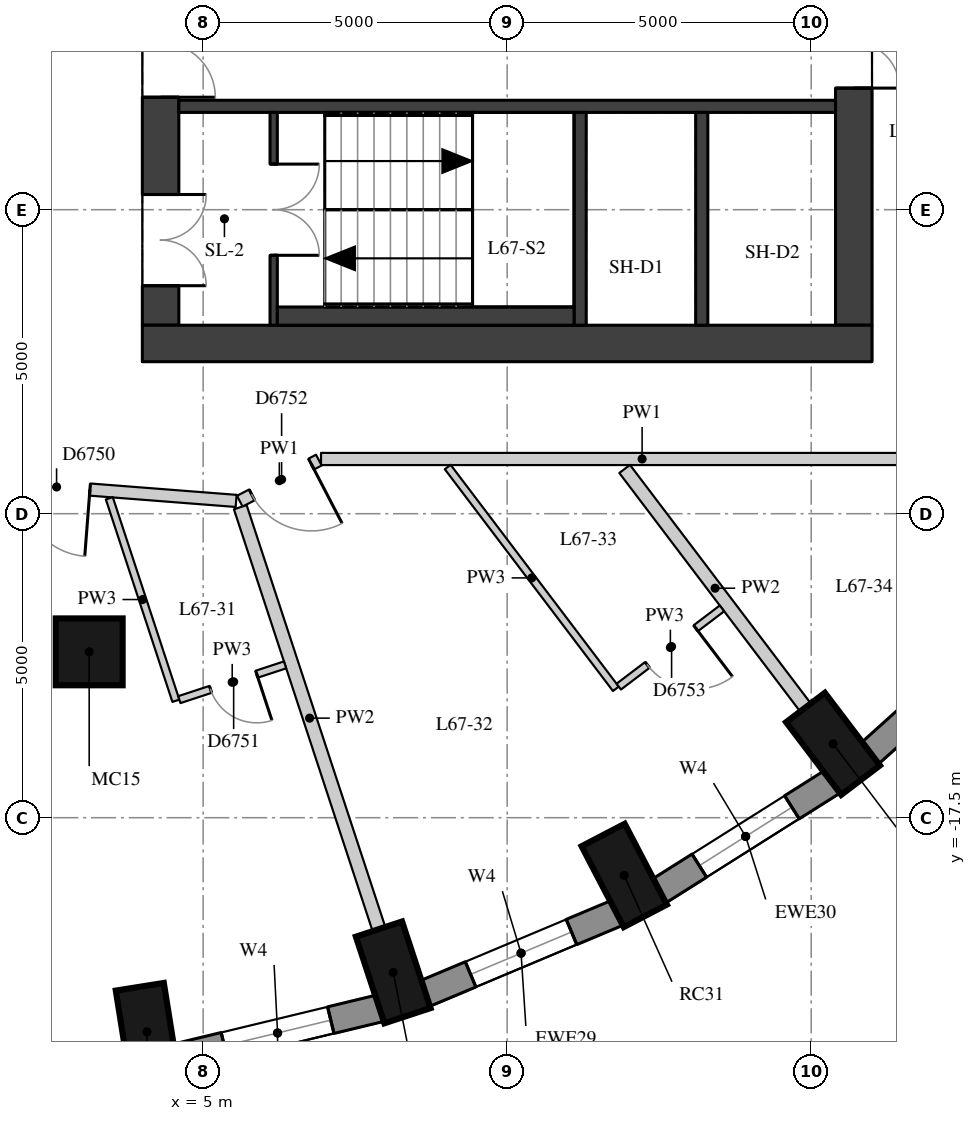
"""IFC4 building model, lengths in metres.
Left out: names, types, materials, properties, quantities, classifications, styles, units other than length and angle.
Written with IfcOpenShell. Run it as: python <this file> out.ifc"""

import sys

from ifc_helpers import new_model, si_unit, direction, frame, frame_2d, origin, origin_2d, place, context, subcontext, project, spatial, rectangle, extrude, element, fill, save


model = new_model("IFC4")
c1 = context("Model", 3, precision=1e-05, world=origin(), true_north=direction((0.0, 1.0)))
c2 = subcontext(c1, "Body", "Model", "MODEL_VIEW")
j1 = project(units=[si_unit("LENGTHUNIT", "METRE"), si_unit("PLANEANGLEUNIT", "RADIAN")], contexts=[c1])
p1 = place(None, origin())
s1 = spatial("IfcSite", under=j1, at=p1, CompositionType="ELEMENT")
p2 = place(p1, origin())
s2 = spatial("IfcBuilding", under=s1, at=p2, CompositionType="ELEMENT")
p3 = place(p2, frame((0.0, 0.0, 236.6)))
s3 = spatial("IfcBuildingStorey", under=s2, at=p3, CompositionType="ELEMENT", Elevation=236.6)
for number, where, z_axis, x_axis in (
    (1, (4.076, -21.021, 0.0), (0.0, 0.0, 1.0), (0.157, -0.988, 0.0)),
    (2, (8.125, -20.044, 0.0), (0.0, 0.0, 1.0), (0.312, -0.95, 0.0)),
    (3, (11.925, -18.449, 0.0), (0.0, 0.0, 1.0), (0.462, -0.887, 0.0)),
    (4, (15.359, -16.285, 0.0), (0.0, 0.0, 1.0), (0.604, -0.797, 0.0)),
):
    element("IfcColumn", number, at=place(p3, frame(where, z_axis=z_axis, x_axis=x_axis)), inside=s3, PredefinedType="COLUMN", context=c2, shape_type="SweptSolid", body=[
        extrude(rectangle(XDim=1.5, YDim=0.8, at=origin_2d()), origin(), (0.0, 0.0, 1.0), 3.3),
    ])
p4 = place(p3, frame((3.126, -14.772, 0.0), z_axis=(0.0, 0.0, 1.0), x_axis=(1.0, 0.0, 0.0)))
e5 = element("IfcColumn", 5, at=p4, inside=s3, PredefinedType="COLUMN", context=c2, shape_type="SweptSolid", body=[
    extrude(rectangle(XDim=1.1, YDim=1.1, at=origin_2d()), origin(), (0.0, 0.0, 1.0), 3.3),
])
p5 = place(p3, frame((4.529, -21.449, 0.0), z_axis=(0.0, 0.0, 1.0), x_axis=(0.972115243017, 0.234503633859, 0.0)))
e6 = element("IfcWall", 6, at=p5, inside=s3, PredefinedType="SOLIDWALL", context=c2, shape_type="SweptSolid", body=[
    extrude(rectangle(XDim=3.487, YDim=0.45, at=frame_2d((1.743, 0.0))), origin(), (0.0, 0.0, 1.0), 3.02),
])
p6 = place(p5, frame((0.843, 0.0, 0.4)))
e7 = element("IfcOpeningElement", 7, at=p6, cuts=e6, PredefinedType="OPENING", context=c2, shape_type="SweptSolid", body=[
    extrude(rectangle(XDim=1.8, YDim=1.75, at=frame_2d((0.9, 0.875))), frame((0.0, 0.235, 0.0), z_axis=(0.0, -1.0, 0.0), x_axis=(1.0, 0.0, 0.0)), (0.0, 0.0, 1.0), 0.47),
])
p7 = place(p3, frame((8.641, -20.395, 0.0), z_axis=(0.0, 0.0, 1.0), x_axis=(0.922049934692, 0.3870709469, 0.0)))
e8 = element("IfcWall", 8, at=p7, inside=s3, PredefinedType="SOLIDWALL", context=c2, shape_type="SweptSolid", body=[
    extrude(rectangle(XDim=3.443, YDim=0.45, at=frame_2d((1.722, 0.0))), origin(), (0.0, 0.0, 1.0), 3.02),
])
p8 = place(p7, frame((0.822, 0.0, 0.4)))
e9 = element("IfcOpeningElement", 9, at=p8, cuts=e8, PredefinedType="OPENING", context=c2, shape_type="SweptSolid", body=[
    extrude(rectangle(XDim=1.8, YDim=1.75, at=frame_2d((0.9, 0.875))), frame((0.0, 0.235, 0.0), z_axis=(0.0, -1.0, 0.0), x_axis=(1.0, 0.0, 0.0)), (0.0, 0.0, 1.0), 0.47),
])
p9 = place(p3, frame((12.49, -18.711, 0.0), z_axis=(0.0, 0.0, 1.0), x_axis=(0.845929139811, 0.53329531258, 0.0)))
e10 = element("IfcWall", 10, at=p9, inside=s3, PredefinedType="SOLIDWALL", context=c2, shape_type="SweptSolid", body=[
    extrude(rectangle(XDim=3.385, YDim=0.45, at=frame_2d((1.692, 0.0))), origin(), (0.0, 0.0, 1.0), 3.02),
])
p10 = place(p9, frame((0.792, 0.0, 0.4)))
e11 = element("IfcOpeningElement", 11, at=p10, cuts=e10, PredefinedType="OPENING", context=c2, shape_type="SweptSolid", body=[
    extrude(rectangle(XDim=1.8, YDim=1.75, at=frame_2d((0.9, 0.875))), frame((0.0, 0.235, 0.0), z_axis=(0.0, -1.0, 0.0), x_axis=(1.0, 0.0, 0.0)), (0.0, 0.0, 1.0), 0.47),
])
p11 = place(p3, frame((15.959, -16.448, 0.0), z_axis=(0.0, 0.0, 1.0), x_axis=(0.743166014219, 0.669107073128, 0.0)))
e12 = element("IfcWall", 12, at=p11, inside=s3, PredefinedType="SOLIDWALL", context=c2, shape_type="SweptSolid", body=[
    extrude(rectangle(XDim=3.316, YDim=0.45, at=frame_2d((1.658, 0.0))), origin(), (0.0, 0.0, 1.0), 3.02),
])
p12 = place(p3, frame((4.3, -9.4, 0.0), z_axis=(0.0, 0.0, 1.0), x_axis=(0.0, 1.0, 0.0)))
e13 = element("IfcWall", 13, at=p12, inside=s3, PredefinedType="SHEAR", context=c2, shape_type="SweptSolid", body=[
    extrude(rectangle(XDim=18.8, YDim=0.6, at=frame_2d((9.4, 0.0))), origin(), (0.0, 0.0, 1.0), 3.02),
])
p13 = place(p12, frame((0.65, 0.0, 0.0)))
e14 = element("IfcOpeningElement", 14, at=p13, cuts=e13, PredefinedType="OPENING", context=c2, shape_type="SweptSolid", body=[
    extrude(rectangle(XDim=1.5, YDim=2.1, at=frame_2d((0.75, 1.05))), frame((0.0, 0.31, 0.0), z_axis=(0.0, -1.0, 0.0), x_axis=(1.0, 0.0, 0.0)), (0.0, 0.0, 1.0), 0.62),
])
p14 = place(p12, frame((3.75, 0.0, 0.0)))
e15 = element("IfcOpeningElement", 15, at=p14, cuts=e13, PredefinedType="OPENING", context=c2, shape_type="SweptSolid", body=[
    extrude(rectangle(XDim=1.8, YDim=2.1, at=frame_2d((0.9, 1.05))), frame((0.0, 0.31, 0.0), z_axis=(0.0, -1.0, 0.0), x_axis=(1.0, 0.0, 0.0)), (0.0, 0.0, 1.0), 0.62),
])
p15 = place(p12, frame((6.25, 0.0, 0.0)))
e16 = element("IfcOpeningElement", 16, at=p15, cuts=e13, PredefinedType="OPENING", context=c2, shape_type="SweptSolid", body=[
    extrude(rectangle(XDim=1.1, YDim=2.1, at=frame_2d((0.55, 1.05))), frame((0.0, 0.31, 0.0), z_axis=(0.0, -1.0, 0.0), x_axis=(1.0, 0.0, 0.0)), (0.0, 0.0, 1.0), 0.62),
])
p16 = place(p12, frame((8.9, 0.0, 0.0)))
e17 = element("IfcOpeningElement", 17, at=p16, cuts=e13, PredefinedType="OPENING", context=c2, shape_type="SweptSolid", body=[
    extrude(rectangle(XDim=1.0, YDim=2.1, at=frame_2d((0.5, 1.05))), frame((0.0, 0.31, 0.0), z_axis=(0.0, -1.0, 0.0), x_axis=(1.0, 0.0, 0.0)), (0.0, 0.0, 1.0), 0.62),
])
p17 = place(p12, frame((11.45, 0.0, 0.0)))
e18 = element("IfcOpeningElement", 18, at=p17, cuts=e13, PredefinedType="OPENING", context=c2, shape_type="SweptSolid", body=[
    extrude(rectangle(XDim=1.1, YDim=2.1, at=frame_2d((0.55, 1.05))), frame((0.0, 0.31, 0.0), z_axis=(0.0, -1.0, 0.0), x_axis=(1.0, 0.0, 0.0)), (0.0, 0.0, 1.0), 0.62),
])
p18 = place(p12, frame((13.25, 0.0, 0.0)))
e19 = element("IfcOpeningElement", 19, at=p18, cuts=e13, PredefinedType="OPENING", context=c2, shape_type="SweptSolid", body=[
    extrude(rectangle(XDim=1.8, YDim=2.1, at=frame_2d((0.9, 1.05))), frame((0.0, 0.31, 0.0), z_axis=(0.0, -1.0, 0.0), x_axis=(1.0, 0.0, 0.0)), (0.0, 0.0, 1.0), 0.62),
])
p19 = place(p12, frame((16.65, 0.0, 0.0)))
e20 = element("IfcOpeningElement", 20, at=p19, cuts=e13, PredefinedType="OPENING", context=c2, shape_type="SweptSolid", body=[
    extrude(rectangle(XDim=1.5, YDim=2.1, at=frame_2d((0.75, 1.05))), frame((0.0, 0.31, 0.0), z_axis=(0.0, -1.0, 0.0), x_axis=(1.0, 0.0, 0.0)), (0.0, 0.0, 1.0), 0.62),
])
p20 = place(p3, frame((15.7, -9.4, 0.0), z_axis=(0.0, 0.0, 1.0), x_axis=(0.0, 1.0, 0.0)))
e21 = element("IfcWall", 21, at=p20, inside=s3, PredefinedType="SHEAR", context=c2, shape_type="SweptSolid", body=[
    extrude(rectangle(XDim=18.8, YDim=0.6, at=frame_2d((9.4, 0.0))), origin(), (0.0, 0.0, 1.0), 3.02),
])
p21 = place(p20, frame((13.4, 0.0, 0.0)))
e22 = element("IfcOpeningElement", 22, at=p21, cuts=e21, PredefinedType="OPENING", context=c2, shape_type="SweptSolid", body=[
    extrude(rectangle(XDim=1.5, YDim=2.1, at=frame_2d((0.75, 1.05))), frame((0.0, 0.31, 0.0), z_axis=(0.0, -1.0, 0.0), x_axis=(1.0, 0.0, 0.0)), (0.0, 0.0, 1.0), 0.62),
])
p22 = place(p20, frame((3.9, 0.0, 0.0)))
e23 = element("IfcOpeningElement", 23, at=p22, cuts=e21, PredefinedType="OPENING", context=c2, shape_type="SweptSolid", body=[
    extrude(rectangle(XDim=1.5, YDim=2.1, at=frame_2d((0.75, 1.05))), frame((0.0, 0.31, 0.0), z_axis=(0.0, -1.0, 0.0), x_axis=(1.0, 0.0, 0.0)), (0.0, 0.0, 1.0), 0.62),
])
p23 = place(p3, frame((4.0, -9.7, 0.0), z_axis=(0.0, 0.0, 1.0), x_axis=(1.0, 0.0, 0.0)))
e24 = element("IfcWall", 24, at=p23, inside=s3, PredefinedType="SHEAR", context=c2, shape_type="SweptSolid", body=[
    extrude(rectangle(XDim=12.0, YDim=0.6, at=frame_2d((6.0, 0.0))), origin(), (0.0, 0.0, 1.0), 3.02),
])
p24 = place(p3, frame((4.6, -5.8, 0.0), z_axis=(0.0, 0.0, 1.0), x_axis=(1.0, 0.0, 0.0)))
e25 = element("IfcWall", 25, at=p24, inside=s3, PredefinedType="SHEAR", context=c2, shape_type="SweptSolid", body=[
    extrude(rectangle(XDim=10.8, YDim=0.2, at=frame_2d((5.4, 0.0))), origin(), (0.0, 0.0, 1.0), 3.02),
])
for number, where, z_axis, x_axis in (
    (26, (11.2, -9.4, 0.0), (0.0, 0.0, 1.0), (0.0, 1.0, 0.0)),
    (27, (13.2, -9.4, 0.0), (0.0, 0.0, 1.0), (0.0, 1.0, 0.0)),
):
    element("IfcWall", number, at=place(p3, frame(where, z_axis=z_axis, x_axis=x_axis)), inside=s3, PredefinedType="SHEAR", context=c2, shape_type="SweptSolid", body=[
        extrude(rectangle(XDim=3.5, YDim=0.2, at=frame_2d((1.75, 0.0))), origin(), (0.0, 0.0, 1.0), 3.02),
    ])
p25 = place(p3, frame((6.16, -9.4, 0.0), z_axis=(0.0, 0.0, 1.0), x_axis=(0.0, 1.0, 0.0)))
e28 = element("IfcWall", 28, at=p25, inside=s3, PredefinedType="SHEAR", context=c2, shape_type="SweptSolid", body=[
    extrude(rectangle(XDim=3.5, YDim=0.12, at=frame_2d((1.75, 0.0))), origin(), (0.0, 0.0, 1.0), 3.02),
])
p26 = place(p25, frame((1.15, 0.0, 0.0)))
e29 = element("IfcOpeningElement", 29, at=p26, cuts=e28, PredefinedType="OPENING", context=c2, shape_type="SweptSolid", body=[
    extrude(rectangle(XDim=1.5, YDim=2.1, at=frame_2d((0.75, 1.05))), frame((0.0, 0.07, 0.0), z_axis=(0.0, -1.0, 0.0), x_axis=(1.0, 0.0, 0.0)), (0.0, 0.0, 1.0), 0.14),
])
p27 = place(p3, frame((6.22, -9.25, 0.0), z_axis=(0.0, 0.0, 1.0), x_axis=(1.0, 0.0, 0.0)))
e30 = element("IfcWall", 30, at=p27, inside=s3, PredefinedType="PARTITIONING", context=c2, shape_type="SweptSolid", body=[
    extrude(rectangle(XDim=4.88, YDim=0.3, at=frame_2d((2.44, 0.0))), origin(), (0.0, 0.0, 1.0), 3.02),
])
p28 = place(p3, frame((17.5, -11.6, 0.0), z_axis=(0.0, 0.0, 1.0), x_axis=(-1.0, 0.0, 0.0)))
e31 = element("IfcWall", 31, at=p28, inside=s3, PredefinedType="PARTITIONING", context=c2, shape_type="SweptSolid", body=[
    extrude(rectangle(XDim=10.562, YDim=0.2, at=frame_2d((5.281, 0.0))), origin(), (0.0, 0.0, 1.0), 3.02),
])
p29 = place(p3, frame((6.903, -11.619, 0.0), z_axis=(0.0, 0.0, 1.0), x_axis=(-0.887353179844, -0.461090375329, 0.0)))
e32 = element("IfcWall", 32, at=p29, inside=s3, PredefinedType="PARTITIONING", context=c2, shape_type="SweptSolid", body=[
    extrude(rectangle(XDim=1.465, YDim=0.2, at=frame_2d((0.732, 0.0))), origin(), (0.0, 0.0, 1.0), 3.02),
])
p30 = place(p29, frame((0.14, 0.0, 0.0)))
e33 = element("IfcOpeningElement", 33, at=p30, cuts=e32, PredefinedType="OPENING", context=c2, shape_type="SweptSolid", body=[
    extrude(rectangle(XDim=1.1, YDim=2.1, at=frame_2d((0.55, 1.05))), frame((0.0, 0.11, 0.0), z_axis=(0.0, -1.0, 0.0), x_axis=(1.0, 0.0, 0.0)), (0.0, 0.0, 1.0), 0.22),
])
p31 = place(p3, frame((5.542, -12.29, 0.0), z_axis=(0.0, 0.0, 1.0), x_axis=(-0.996994281558, 0.077475173702, 0.0)))
e34 = element("IfcWall", 34, at=p31, inside=s3, PredefinedType="PARTITIONING", context=c2, shape_type="SweptSolid", body=[
    extrude(rectangle(XDim=13.282, YDim=0.2, at=frame_2d((6.641, 0.0))), origin(), (0.0, 0.0, 1.0), 3.02),
])
p32 = place(p31, frame((2.412, 0.0, 0.0)))
e35 = element("IfcOpeningElement", 35, at=p32, cuts=e34, PredefinedType="OPENING", context=c2, shape_type="SweptSolid", body=[
    extrude(rectangle(XDim=1.1, YDim=2.1, at=frame_2d((0.55, 1.05))), frame((0.0, 0.11, 0.0), z_axis=(0.0, -1.0, 0.0), x_axis=(1.0, 0.0, 0.0)), (0.0, 0.0, 1.0), 0.22),
])
p33 = place(p3, frame((7.891, -19.332, 0.0), z_axis=(0.0, 0.0, 1.0), x_axis=(-0.312264049527, 0.949995349132, 0.0)))
e36 = element("IfcWall", 36, at=p33, inside=s3, PredefinedType="PARTITIONING", context=c2, shape_type="SweptSolid", body=[
    extrude(rectangle(XDim=7.304, YDim=0.22, at=frame_2d((3.652, 0.0))), origin(), (0.0, 0.0, 1.0), 3.02),
])
p34 = place(p3, frame((14.906, -15.687, 0.0), z_axis=(0.0, 0.0, 1.0), x_axis=(-0.604078206052, 0.796925041, 0.0)))
e37 = element("IfcWall", 37, at=p34, inside=s3, PredefinedType="PARTITIONING", context=c2, shape_type="SweptSolid", body=[
    extrude(rectangle(XDim=4.923, YDim=0.22, at=frame_2d((2.462, 0.0))), origin(), (0.0, 0.0, 1.0), 3.02),
])
p35 = place(p3, frame((3.457, -12.246, 0.0), z_axis=(0.0, 0.0, 1.0), x_axis=(0.312255646562, -0.949998111151, 0.0)))
e38 = element("IfcWall", 38, at=p35, inside=s3, PredefinedType="PARTITIONING", context=c2, shape_type="SweptSolid", body=[
    extrude(rectangle(XDim=3.506, YDim=0.12, at=frame_2d((1.753, 0.0))), origin(), (0.0, 0.0, 1.0), 3.02),
])
p36 = place(p3, frame((9.022, -11.732, 0.0), z_axis=(0.0, 0.0, 1.0), x_axis=(0.604079451594, -0.796924096863, 0.0)))
e39 = element("IfcWall", 39, at=p36, inside=s3, PredefinedType="PARTITIONING", context=c2, shape_type="SweptSolid", body=[
    extrude(rectangle(XDim=4.578, YDim=0.12, at=frame_2d((2.289, 0.0))), origin(), (0.0, 0.0, 1.0), 3.02),
])
p37 = place(p3, frame((4.608, -15.558, 0.0), z_axis=(0.0, 0.0, 1.0), x_axis=(0.949995576072, 0.312263359111, 0.0)))
e40 = element("IfcWall", 40, at=p37, inside=s3, PredefinedType="PARTITIONING", context=c2, shape_type="SweptSolid", body=[
    extrude(rectangle(XDim=1.83, YDim=0.12, at=frame_2d((0.915, 0.0))), origin(), (0.0, 0.0, 1.0), 3.02),
])
p38 = place(p37, frame((0.54, 0.0, 0.0)))
e41 = element("IfcOpeningElement", 41, at=p38, cuts=e40, PredefinedType="OPENING", context=c2, shape_type="SweptSolid", body=[
    extrude(rectangle(XDim=0.8, YDim=2.1, at=frame_2d((0.4, 1.05))), frame((0.0, 0.07, 0.0), z_axis=(0.0, -1.0, 0.0), x_axis=(1.0, 0.0, 0.0)), (0.0, 0.0, 1.0), 0.14),
])
p39 = place(p3, frame((11.835, -15.344, 0.0), z_axis=(0.0, 0.0, 1.0), x_axis=(0.79693666797, 0.604062866964, 0.0)))
e42 = element("IfcWall", 42, at=p39, inside=s3, PredefinedType="PARTITIONING", context=c2, shape_type="SweptSolid", body=[
    extrude(rectangle(XDim=2.13, YDim=0.12, at=frame_2d((1.065, 0.0))), origin(), (0.0, 0.0, 1.0), 3.02),
])
p40 = place(p39, frame((0.59, 0.0, 0.0)))
e43 = element("IfcOpeningElement", 43, at=p40, cuts=e42, PredefinedType="OPENING", context=c2, shape_type="SweptSolid", body=[
    extrude(rectangle(XDim=1.0, YDim=2.1, at=frame_2d((0.5, 1.05))), frame((0.0, 0.07, 0.0), z_axis=(0.0, -1.0, 0.0), x_axis=(1.0, 0.0, 0.0)), (0.0, 0.0, 1.0), 0.14),
])
p41 = place(p6, origin())
e44 = element("IfcWindow", 44, at=p41, inside=s3, PartitioningType="SINGLE_PANEL", PredefinedType="WINDOW", context=c2, shape_type="SweptSolid", body=[
    extrude(rectangle(XDim=1.8, YDim=1.75, at=frame_2d((0.9, 0.875))), frame((0.0, 0.035, 0.0), z_axis=(0.0, -1.0, 0.0), x_axis=(1.0, 0.0, 0.0)), (0.0, 0.0, 1.0), 0.06),
])
fill(e7, e44)
p42 = place(p8, origin())
e45 = element("IfcWindow", 45, at=p42, inside=s3, PartitioningType="SINGLE_PANEL", PredefinedType="WINDOW", context=c2, shape_type="SweptSolid", body=[
    extrude(rectangle(XDim=1.8, YDim=1.75, at=frame_2d((0.9, 0.875))), frame((0.0, 0.035, 0.0), z_axis=(0.0, -1.0, 0.0), x_axis=(1.0, 0.0, 0.0)), (0.0, 0.0, 1.0), 0.06),
])
fill(e9, e45)
p43 = place(p10, origin())
e46 = element("IfcWindow", 46, at=p43, inside=s3, PartitioningType="SINGLE_PANEL", PredefinedType="WINDOW", context=c2, shape_type="SweptSolid", body=[
    extrude(rectangle(XDim=1.8, YDim=1.75, at=frame_2d((0.9, 0.875))), frame((0.0, 0.035, 0.0), z_axis=(0.0, -1.0, 0.0), x_axis=(1.0, 0.0, 0.0)), (0.0, 0.0, 1.0), 0.06),
])
fill(e11, e46)
p44 = place(p13, origin())
e47 = element("IfcDoor", 47, at=p44, inside=s3, OperationType="DOUBLE_DOOR_SINGLE_SWING", PredefinedType="DOOR", context=c2, shape_type="SweptSolid", body=[
    extrude(rectangle(XDim=1.5, YDim=2.1, at=frame_2d((0.75, 1.05))), frame((0.0, 0.025, 0.0), z_axis=(0.0, -1.0, 0.0), x_axis=(1.0, 0.0, 0.0)), (0.0, 0.0, 1.0), 0.05),
])
fill(e14, e47)
p45 = place(p14, origin())
e48 = element("IfcDoor", 48, at=p45, inside=s3, OperationType="DOUBLE_DOOR_SINGLE_SWING", PredefinedType="DOOR", context=c2, shape_type="SweptSolid", body=[
    extrude(rectangle(XDim=1.8, YDim=2.1, at=frame_2d((0.9, 1.05))), frame((0.0, 0.025, 0.0), z_axis=(0.0, -1.0, 0.0), x_axis=(1.0, 0.0, 0.0)), (0.0, 0.0, 1.0), 0.05),
])
fill(e15, e48)
p46 = place(p22, origin())
e49 = element("IfcDoor", 49, at=p46, inside=s3, OperationType="DOUBLE_DOOR_SINGLE_SWING", PredefinedType="DOOR", context=c2, shape_type="SweptSolid", body=[
    extrude(rectangle(XDim=1.5, YDim=2.1, at=frame_2d((0.75, 1.05))), frame((0.0, 0.025, 0.0), z_axis=(0.0, -1.0, 0.0), x_axis=(1.0, 0.0, 0.0)), (0.0, 0.0, 1.0), 0.05),
])
fill(e23, e49)
p47 = place(p26, origin())
e50 = element("IfcDoor", 50, at=p47, inside=s3, OperationType="DOUBLE_DOOR_SINGLE_SWING", PredefinedType="DOOR", context=c2, shape_type="SweptSolid", body=[
    extrude(rectangle(XDim=1.5, YDim=2.1, at=frame_2d((0.75, 1.05))), frame((0.0, 0.025, 0.0), z_axis=(0.0, -1.0, 0.0), x_axis=(1.0, 0.0, 0.0)), (0.0, 0.0, 1.0), 0.05),
])
fill(e29, e50)
p48 = place(p32, origin())
e51 = element("IfcDoor", 51, at=p48, inside=s3, OperationType="SINGLE_SWING_LEFT", PredefinedType="DOOR", context=c2, shape_type="SweptSolid", body=[
    extrude(rectangle(XDim=1.1, YDim=2.1, at=frame_2d((0.55, 1.05))), frame((0.0, 0.025, 0.0), z_axis=(0.0, -1.0, 0.0), x_axis=(1.0, 0.0, 0.0)), (0.0, 0.0, 1.0), 0.05),
])
fill(e35, e51)
p49 = place(p38, origin())
e52 = element("IfcDoor", 52, at=p49, inside=s3, OperationType="SINGLE_SWING_LEFT", PredefinedType="DOOR", context=c2, shape_type="SweptSolid", body=[
    extrude(rectangle(XDim=0.8, YDim=2.1, at=frame_2d((0.4, 1.05))), frame((0.0, 0.025, 0.0), z_axis=(0.0, -1.0, 0.0), x_axis=(1.0, 0.0, 0.0)), (0.0, 0.0, 1.0), 0.05),
])
fill(e41, e52)
p50 = place(p30, origin())
e53 = element("IfcDoor", 53, at=p50, inside=s3, OperationType="SINGLE_SWING_LEFT", PredefinedType="DOOR", context=c2, shape_type="SweptSolid", body=[
    extrude(rectangle(XDim=1.1, YDim=2.1, at=frame_2d((0.55, 1.05))), frame((0.0, 0.025, 0.0), z_axis=(0.0, -1.0, 0.0), x_axis=(1.0, 0.0, 0.0)), (0.0, 0.0, 1.0), 0.05),
])
fill(e33, e53)
p51 = place(p40, origin())
e54 = element("IfcDoor", 54, at=p51, inside=s3, OperationType="SINGLE_SWING_LEFT", PredefinedType="DOOR", context=c2, shape_type="SweptSolid", body=[
    extrude(rectangle(XDim=1.0, YDim=2.1, at=frame_2d((0.5, 1.05))), frame((0.0, 0.025, 0.0), z_axis=(0.0, -1.0, 0.0), x_axis=(1.0, 0.0, 0.0)), (0.0, 0.0, 1.0), 0.05),
])
fill(e43, e54)
save(model, sys.argv[1])
